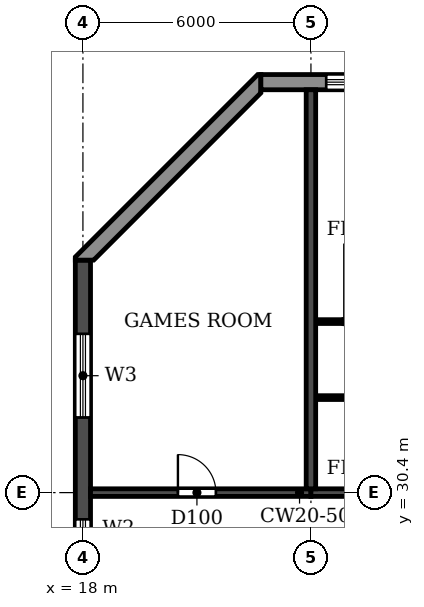
"""IFC4 building model, lengths in metres.
Left out: names, types, materials, properties, quantities, classifications, styles, units other than length and angle.
Written with IfcOpenShell. Run it as: python <this file> out.ifc"""

import sys

from ifc_helpers import new_model, si_unit, direction, frame, frame_2d, origin, place, context, subcontext, project, spatial, polyline, rectangle, outline, extrude, element, fill, save


model = new_model("IFC4")
c1 = context("Model", 3, precision=1e-05, world=origin(), true_north=direction((0.0, 1.0)))
c2 = subcontext(c1, "Body", "Model", "MODEL_VIEW")
j1 = project(units=[si_unit("LENGTHUNIT", "METRE"), si_unit("PLANEANGLEUNIT", "RADIAN")], contexts=[c1])
p1 = place(None, origin())
s1 = spatial("IfcSite", under=j1, at=p1, CompositionType="ELEMENT")
p2 = place(p1, origin())
s2 = spatial("IfcBuilding", under=s1, at=p2, CompositionType="ELEMENT")
p3 = place(p2, frame((0.0, 0.0, 251.1)))
s3 = spatial("IfcBuildingStorey", under=s2, at=p3, CompositionType="ELEMENT", Elevation=251.1)
p4 = place(p3, frame((24.0, 30.5, 0.0), z_axis=(0.0, 0.0, 1.0), x_axis=(0.0, 1.0, 0.0)))
e1 = element("IfcWall", 1, at=p4, inside=s3, PredefinedType="SHEAR", context=c2, shape_type="SweptSolid", body=[
    extrude(rectangle(XDim=10.5, YDim=0.25, at=frame_2d((5.25, 0.0))), origin(), (0.0, 0.0, 1.0), 3.08),
])
p5 = place(p3, frame((18.0, 4.683, 0.0), z_axis=(0.0, 0.0, 1.0), x_axis=(0.0, 1.0, 0.0)))
e2 = element("IfcWall", 2, at=p5, inside=s3, PredefinedType="SHEAR", context=c2, shape_type="SweptSolid", body=[
    extrude(rectangle(XDim=31.834, YDim=0.4, at=frame_2d((15.917, 0.0))), origin(), (0.0, 0.0, 1.0), 3.08),
])
p6 = place(p5, frame((23.817, 0.0, 0.9)))
e3 = element("IfcOpeningElement", 3, at=p6, cuts=e2, PredefinedType="OPENING", context=c2, shape_type="SweptSolid", body=[
    extrude(rectangle(XDim=1.2, YDim=1.5, at=frame_2d((0.6, 0.75))), frame((0.0, 0.21, 0.0), z_axis=(0.0, -1.0, 0.0), x_axis=(1.0, 0.0, 0.0)), (0.0, 0.0, 1.0), 0.42),
])
p7 = place(p5, frame((8.017, 0.0, 0.9)))
e4 = element("IfcOpeningElement", 4, at=p7, cuts=e2, PredefinedType="OPENING", context=c2, shape_type="SweptSolid", body=[
    extrude(rectangle(XDim=1.2, YDim=1.5, at=frame_2d((0.6, 0.75))), frame((0.0, 0.21, 0.0), z_axis=(0.0, -1.0, 0.0), x_axis=(1.0, 0.0, 0.0)), (0.0, 0.0, 1.0), 0.42),
])
p8 = place(p5, frame((27.694, 0.0, 0.6)))
e5 = element("IfcOpeningElement", 5, at=p8, cuts=e2, PredefinedType="OPENING", context=c2, shape_type="SweptSolid", body=[
    extrude(rectangle(XDim=2.2, YDim=1.8, at=frame_2d((1.1, 0.9))), frame((0.0, 0.21, 0.0), z_axis=(0.0, -1.0, 0.0), x_axis=(1.0, 0.0, 0.0)), (0.0, 0.0, 1.0), 0.42),
])
p9 = place(p5, frame((2.541, 0.0, 0.6)))
e6 = element("IfcOpeningElement", 6, at=p9, cuts=e2, PredefinedType="OPENING", context=c2, shape_type="SweptSolid", body=[
    extrude(rectangle(XDim=2.2, YDim=1.8, at=frame_2d((1.1, 0.9))), frame((0.0, 0.21, 0.0), z_axis=(0.0, -1.0, 0.0), x_axis=(1.0, 0.0, 0.0)), (0.0, 0.0, 1.0), 0.42),
])
p10 = place(p5, frame((15.917, 0.0, 0.9)))
e7 = element("IfcOpeningElement", 7, at=p10, cuts=e2, PredefinedType="OPENING", context=c2, shape_type="SweptSolid", body=[
    extrude(rectangle(XDim=1.2, YDim=1.5, at=frame_2d((0.6, 0.75))), frame((0.0, 0.21, 0.0), z_axis=(0.0, -1.0, 0.0), x_axis=(1.0, 0.0, 0.0)), (0.0, 0.0, 1.0), 0.42),
])
p11 = place(p3, frame((18.2, 30.4, 0.0), z_axis=(0.0, 0.0, 1.0), x_axis=(1.0, 0.0, 0.0)))
e8 = element("IfcWall", 8, at=p11, inside=s3, PredefinedType="SHEAR", context=c2, shape_type="SweptSolid", body=[
    extrude(rectangle(XDim=5.8, YDim=0.2, at=frame_2d((2.9, 0.0))), origin(), (0.0, 0.0, 1.0), 2.48),
])
p12 = place(p11, frame((2.3, 0.0, 0.0)))
e9 = element("IfcOpeningElement", 9, at=p12, cuts=e8, PredefinedType="OPENING", context=c2, shape_type="SweptSolid", body=[
    extrude(rectangle(XDim=1.0, YDim=2.1, at=frame_2d((0.5, 1.05))), frame((0.0, 0.11, 0.0), z_axis=(0.0, -1.0, 0.0), x_axis=(1.0, 0.0, 0.0)), (0.0, 0.0, 1.0), 0.22),
])
p13 = place(p3, frame((24.0, 30.4, 0.0), z_axis=(0.0, 0.0, 1.0), x_axis=(1.0, 0.0, 0.0)))
e10 = element("IfcWall", 10, at=p13, inside=s3, PredefinedType="SHEAR", context=c2, shape_type="SweptSolid", body=[
    extrude(rectangle(XDim=6.0, YDim=0.2, at=frame_2d((3.0, 0.0))), origin(), (0.0, 0.0, 1.0), 2.48),
])
p14 = place(p3, frame((79.317, 41.2, 0.0), z_axis=(0.0, 0.0, 1.0), x_axis=(-1.0, 0.0, 0.0)))
e11 = element("IfcWall", 11, at=p14, inside=s3, PredefinedType="STANDARD", context=c2, shape_type="SweptSolid", body=[
    extrude(rectangle(XDim=56.634, YDim=0.4, at=frame_2d((28.317, 0.0))), origin(), (0.0, 0.0, 1.0), 3.08),
])
p15 = place(p14, frame((52.717, 0.0, 0.9)))
e12 = element("IfcOpeningElement", 12, at=p15, cuts=e11, PredefinedType="OPENING", context=c2, shape_type="SweptSolid", body=[
    extrude(rectangle(XDim=2.2, YDim=1.5, at=frame_2d((1.1, 0.75))), frame((0.0, 0.21, 0.0), z_axis=(0.0, -1.0, 0.0), x_axis=(1.0, 0.0, 0.0)), (0.0, 0.0, 1.0), 0.42),
])
p16 = place(p14, frame((49.717, 0.0, 0.9)))
e13 = element("IfcOpeningElement", 13, at=p16, cuts=e11, PredefinedType="OPENING", context=c2, shape_type="SweptSolid", body=[
    extrude(rectangle(XDim=2.2, YDim=1.5, at=frame_2d((1.1, 0.75))), frame((0.0, 0.21, 0.0), z_axis=(0.0, -1.0, 0.0), x_axis=(1.0, 0.0, 0.0)), (0.0, 0.0, 1.0), 0.42),
])
p17 = place(p14, frame((46.717, 0.0, 0.9)))
e14 = element("IfcOpeningElement", 14, at=p17, cuts=e11, PredefinedType="OPENING", context=c2, shape_type="SweptSolid", body=[
    extrude(rectangle(XDim=2.2, YDim=1.5, at=frame_2d((1.1, 0.75))), frame((0.0, 0.21, 0.0), z_axis=(0.0, -1.0, 0.0), x_axis=(1.0, 0.0, 0.0)), (0.0, 0.0, 1.0), 0.42),
])
p18 = place(p14, frame((43.917, 0.0, 0.0)))
e15 = element("IfcOpeningElement", 15, at=p18, cuts=e11, PredefinedType="OPENING", context=c2, shape_type="SweptSolid", body=[
    extrude(rectangle(XDim=1.8, YDim=2.4, at=frame_2d((0.9, 1.2))), frame((0.0, 0.21, 0.0), z_axis=(0.0, -1.0, 0.0), x_axis=(1.0, 0.0, 0.0)), (0.0, 0.0, 1.0), 0.42),
])
p19 = place(p14, frame((40.717, 0.0, 0.9)))
e16 = element("IfcOpeningElement", 16, at=p19, cuts=e11, PredefinedType="OPENING", context=c2, shape_type="SweptSolid", body=[
    extrude(rectangle(XDim=2.2, YDim=1.5, at=frame_2d((1.1, 0.75))), frame((0.0, 0.21, 0.0), z_axis=(0.0, -1.0, 0.0), x_axis=(1.0, 0.0, 0.0)), (0.0, 0.0, 1.0), 0.42),
])
p20 = place(p14, frame((37.917, 0.0, 0.0)))
e17 = element("IfcOpeningElement", 17, at=p20, cuts=e11, PredefinedType="OPENING", context=c2, shape_type="SweptSolid", body=[
    extrude(rectangle(XDim=1.8, YDim=2.4, at=frame_2d((0.9, 1.2))), frame((0.0, 0.21, 0.0), z_axis=(0.0, -1.0, 0.0), x_axis=(1.0, 0.0, 0.0)), (0.0, 0.0, 1.0), 0.42),
])
p21 = place(p14, frame((34.717, 0.0, 0.9)))
e18 = element("IfcOpeningElement", 18, at=p21, cuts=e11, PredefinedType="OPENING", context=c2, shape_type="SweptSolid", body=[
    extrude(rectangle(XDim=2.2, YDim=1.5, at=frame_2d((1.1, 0.75))), frame((0.0, 0.21, 0.0), z_axis=(0.0, -1.0, 0.0), x_axis=(1.0, 0.0, 0.0)), (0.0, 0.0, 1.0), 0.42),
])
p22 = place(p14, frame((31.717, 0.0, 0.9)))
e19 = element("IfcOpeningElement", 19, at=p22, cuts=e11, PredefinedType="OPENING", context=c2, shape_type="SweptSolid", body=[
    extrude(rectangle(XDim=2.2, YDim=1.5, at=frame_2d((1.1, 0.75))), frame((0.0, 0.21, 0.0), z_axis=(0.0, -1.0, 0.0), x_axis=(1.0, 0.0, 0.0)), (0.0, 0.0, 1.0), 0.42),
])
p23 = place(p14, frame((28.717, 0.0, 0.9)))
e20 = element("IfcOpeningElement", 20, at=p23, cuts=e11, PredefinedType="OPENING", context=c2, shape_type="SweptSolid", body=[
    extrude(rectangle(XDim=2.2, YDim=1.5, at=frame_2d((1.1, 0.75))), frame((0.0, 0.21, 0.0), z_axis=(0.0, -1.0, 0.0), x_axis=(1.0, 0.0, 0.0)), (0.0, 0.0, 1.0), 0.42),
])
p24 = place(p14, frame((25.917, 0.0, 0.0)))
e21 = element("IfcOpeningElement", 21, at=p24, cuts=e11, PredefinedType="OPENING", context=c2, shape_type="SweptSolid", body=[
    extrude(rectangle(XDim=1.8, YDim=2.4, at=frame_2d((0.9, 1.2))), frame((0.0, 0.21, 0.0), z_axis=(0.0, -1.0, 0.0), x_axis=(1.0, 0.0, 0.0)), (0.0, 0.0, 1.0), 0.42),
])
p25 = place(p14, frame((22.917, 0.0, 0.0)))
e22 = element("IfcOpeningElement", 22, at=p25, cuts=e11, PredefinedType="OPENING", context=c2, shape_type="SweptSolid", body=[
    extrude(rectangle(XDim=1.8, YDim=2.4, at=frame_2d((0.9, 1.2))), frame((0.0, 0.21, 0.0), z_axis=(0.0, -1.0, 0.0), x_axis=(1.0, 0.0, 0.0)), (0.0, 0.0, 1.0), 0.42),
])
p26 = place(p14, frame((19.717, 0.0, 0.9)))
e23 = element("IfcOpeningElement", 23, at=p26, cuts=e11, PredefinedType="OPENING", context=c2, shape_type="SweptSolid", body=[
    extrude(rectangle(XDim=2.2, YDim=1.5, at=frame_2d((1.1, 0.75))), frame((0.0, 0.21, 0.0), z_axis=(0.0, -1.0, 0.0), x_axis=(1.0, 0.0, 0.0)), (0.0, 0.0, 1.0), 0.42),
])
p27 = place(p14, frame((16.717, 0.0, 0.9)))
e24 = element("IfcOpeningElement", 24, at=p27, cuts=e11, PredefinedType="OPENING", context=c2, shape_type="SweptSolid", body=[
    extrude(rectangle(XDim=2.2, YDim=1.5, at=frame_2d((1.1, 0.75))), frame((0.0, 0.21, 0.0), z_axis=(0.0, -1.0, 0.0), x_axis=(1.0, 0.0, 0.0)), (0.0, 0.0, 1.0), 0.42),
])
p28 = place(p14, frame((13.717, 0.0, 0.9)))
e25 = element("IfcOpeningElement", 25, at=p28, cuts=e11, PredefinedType="OPENING", context=c2, shape_type="SweptSolid", body=[
    extrude(rectangle(XDim=2.2, YDim=1.5, at=frame_2d((1.1, 0.75))), frame((0.0, 0.21, 0.0), z_axis=(0.0, -1.0, 0.0), x_axis=(1.0, 0.0, 0.0)), (0.0, 0.0, 1.0), 0.42),
])
p29 = place(p14, frame((10.717, 0.0, 0.9)))
e26 = element("IfcOpeningElement", 26, at=p29, cuts=e11, PredefinedType="OPENING", context=c2, shape_type="SweptSolid", body=[
    extrude(rectangle(XDim=2.2, YDim=1.5, at=frame_2d((1.1, 0.75))), frame((0.0, 0.21, 0.0), z_axis=(0.0, -1.0, 0.0), x_axis=(1.0, 0.0, 0.0)), (0.0, 0.0, 1.0), 0.42),
])
p30 = place(p14, frame((7.917, 0.0, 0.0)))
e27 = element("IfcOpeningElement", 27, at=p30, cuts=e11, PredefinedType="OPENING", context=c2, shape_type="SweptSolid", body=[
    extrude(rectangle(XDim=1.8, YDim=2.4, at=frame_2d((0.9, 1.2))), frame((0.0, 0.21, 0.0), z_axis=(0.0, -1.0, 0.0), x_axis=(1.0, 0.0, 0.0)), (0.0, 0.0, 1.0), 0.42),
])
p31 = place(p14, frame((4.717, 0.0, 0.9)))
e28 = element("IfcOpeningElement", 28, at=p31, cuts=e11, PredefinedType="OPENING", context=c2, shape_type="SweptSolid", body=[
    extrude(rectangle(XDim=2.2, YDim=1.5, at=frame_2d((1.1, 0.75))), frame((0.0, 0.21, 0.0), z_axis=(0.0, -1.0, 0.0), x_axis=(1.0, 0.0, 0.0)), (0.0, 0.0, 1.0), 0.42),
])
p32 = place(p14, frame((1.917, 0.0, 0.0)))
e29 = element("IfcOpeningElement", 29, at=p32, cuts=e11, PredefinedType="OPENING", context=c2, shape_type="SweptSolid", body=[
    extrude(rectangle(XDim=1.8, YDim=2.4, at=frame_2d((0.9, 1.2))), frame((0.0, 0.21, 0.0), z_axis=(0.0, -1.0, 0.0), x_axis=(1.0, 0.0, 0.0)), (0.0, 0.0, 1.0), 0.42),
])
p33 = place(p3, origin())
e30 = element("IfcWall", 30, at=p33, inside=s3, PredefinedType="STANDARD", context=c2, shape_type="SweptSolid", body=[
    extrude(outline(polyline([(22.683, 41.4), (22.6, 41.4), (17.8, 36.6), (17.8, 36.517), (18.283, 36.517), (22.683, 40.917), (22.683, 41.4)])), origin(), (0.0, 0.0, 1.0), 3.08),
])
p34 = place(p3, frame((24.135, 32.9, 0.0), z_axis=(0.0, 0.0, 1.0), x_axis=(1.0, 0.0, 0.0)))
e31 = element("IfcWall", 31, at=p34, inside=s3, PredefinedType="PARTITIONING", context=c2, shape_type="SweptSolid", body=[
    extrude(rectangle(XDim=3.215, YDim=0.1, at=frame_2d((1.607, 0.0))), origin(), (0.0, 0.0, 1.0), 3.08),
])
p35 = place(p34, frame((1.115, 0.0, 0.0)))
e32 = element("IfcOpeningElement", 32, at=p35, cuts=e31, PredefinedType="OPENING", context=c2, shape_type="SweptSolid", body=[
    extrude(rectangle(XDim=0.8, YDim=2.1, at=frame_2d((0.4, 1.05))), frame((0.0, 0.06, 0.0), z_axis=(0.0, -1.0, 0.0), x_axis=(1.0, 0.0, 0.0)), (0.0, 0.0, 1.0), 0.12),
])
p36 = place(p3, frame((24.135, 34.9, 0.0), z_axis=(0.0, 0.0, 1.0), x_axis=(1.0, 0.0, 0.0)))
e33 = element("IfcWall", 33, at=p36, inside=s3, PredefinedType="PARTITIONING", context=c2, shape_type="SweptSolid", body=[
    extrude(rectangle(XDim=5.73, YDim=0.1, at=frame_2d((2.865, 0.0))), origin(), (0.0, 0.0, 1.0), 3.08),
])
p37 = place(p36, frame((1.465, 0.0, 0.0)))
e34 = element("IfcOpeningElement", 34, at=p37, cuts=e33, PredefinedType="OPENING", context=c2, shape_type="SweptSolid", body=[
    extrude(rectangle(XDim=0.9, YDim=2.1, at=frame_2d((0.45, 1.05))), frame((0.0, 0.06, 0.0), z_axis=(0.0, -1.0, 0.0), x_axis=(1.0, 0.0, 0.0)), (0.0, 0.0, 1.0), 0.12),
])
p38 = place(p36, frame((3.365, 0.0, 0.0)))
e35 = element("IfcOpeningElement", 35, at=p38, cuts=e33, PredefinedType="OPENING", context=c2, shape_type="SweptSolid", body=[
    extrude(rectangle(XDim=0.9, YDim=2.1, at=frame_2d((0.45, 1.05))), frame((0.0, 0.06, 0.0), z_axis=(0.0, -1.0, 0.0), x_axis=(1.0, 0.0, 0.0)), (0.0, 0.0, 1.0), 0.12),
])
p39 = place(p15, origin())
e36 = element("IfcWindow", 36, at=p39, inside=s3, PartitioningType="DOUBLE_PANEL_HORIZONTAL", PredefinedType="WINDOW", context=c2, shape_type="SweptSolid", body=[
    extrude(rectangle(XDim=2.2, YDim=1.5, at=frame_2d((1.1, 0.75))), frame((0.0, 0.03, 0.0), z_axis=(0.0, -1.0, 0.0), x_axis=(1.0, 0.0, 0.0)), (0.0, 0.0, 1.0), 0.06),
])
fill(e12, e36)
p40 = place(p6, origin())
e37 = element("IfcWindow", 37, at=p40, inside=s3, PartitioningType="SINGLE_PANEL", PredefinedType="WINDOW", context=c2, shape_type="SweptSolid", body=[
    extrude(rectangle(XDim=1.2, YDim=1.5, at=frame_2d((0.6, 0.75))), frame((0.0, 0.03, 0.0), z_axis=(0.0, -1.0, 0.0), x_axis=(1.0, 0.0, 0.0)), (0.0, 0.0, 1.0), 0.06),
])
fill(e3, e37)
p41 = place(p8, origin())
e38 = element("IfcWindow", 38, at=p41, inside=s3, PartitioningType="DOUBLE_PANEL_HORIZONTAL", PredefinedType="WINDOW", context=c2, shape_type="SweptSolid", body=[
    extrude(rectangle(XDim=2.2, YDim=1.8, at=frame_2d((1.1, 0.9))), frame((0.0, 0.03, 0.0), z_axis=(0.0, -1.0, 0.0), x_axis=(1.0, 0.0, 0.0)), (0.0, 0.0, 1.0), 0.06),
])
fill(e5, e38)
p42 = place(p12, origin())
e39 = element("IfcDoor", 39, at=p42, inside=s3, OperationType="SINGLE_SWING_LEFT", PredefinedType="DOOR", context=c2, shape_type="SweptSolid", body=[
    extrude(rectangle(XDim=1.0, YDim=2.1, at=frame_2d((0.5, 1.05))), frame((0.0, 0.025, 0.0), z_axis=(0.0, -1.0, 0.0), x_axis=(1.0, 0.0, 0.0)), (0.0, 0.0, 1.0), 0.05),
])
fill(e9, e39)
save(model, sys.argv[1])
